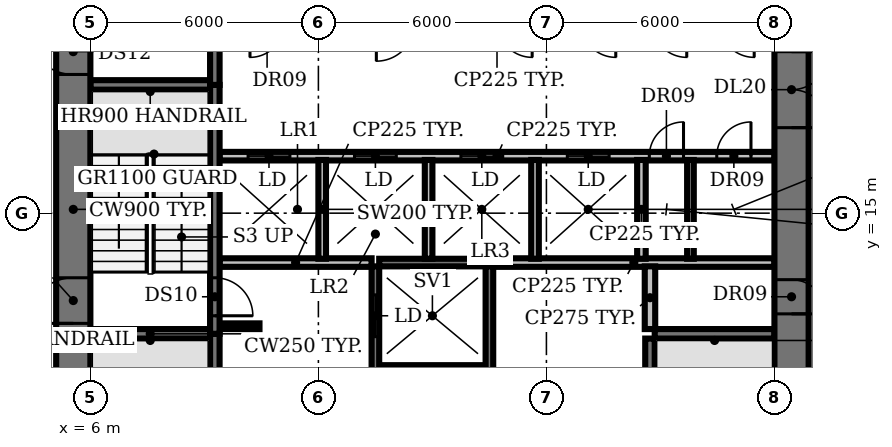
"""IFC4 building model, lengths in metres.
Left out: names, types, materials, properties, quantities, classifications, styles, units other than length and angle.
Written with IfcOpenShell. Run it as: python <this file> out.ifc"""

import sys

from ifc_helpers import new_model, si_unit, direction, frame, frame_2d, origin, place, context, subcontext, project, spatial, rectangle, extrude, element, fill, save


model = new_model("IFC4")
c1 = context("Model", 3, precision=1e-05, world=origin(), true_north=direction((0.0, 1.0)))
c2 = subcontext(c1, "Body", "Model", "MODEL_VIEW")
j1 = project(units=[si_unit("LENGTHUNIT", "METRE"), si_unit("PLANEANGLEUNIT", "RADIAN")], contexts=[c1])
p1 = place(None, origin())
s1 = spatial("IfcSite", under=j1, at=p1, CompositionType="ELEMENT")
p2 = place(p1, origin())
s2 = spatial("IfcBuilding", under=s1, at=p2, CompositionType="ELEMENT")
p3 = place(p2, frame((0.0, 0.0, 29.0)))
s3 = spatial("IfcBuildingStorey", under=s2, at=p3, CompositionType="ELEMENT", Elevation=29.0)
p4 = place(p3, frame((13.6, 10.9, 0.0), z_axis=(0.0, 0.0, 1.0), x_axis=(1.0, 0.0, 0.0)))
e1 = element("IfcWall", 1, at=p4, inside=s3, PredefinedType="SHEAR", context=c2, shape_type="SweptSolid", body=[
    extrude(rectangle(XDim=2.8, YDim=0.2, at=frame_2d((1.4, 0.0))), origin(), (0.0, 0.0, 1.0), 3.85),
])
for number, where, z_axis, x_axis in (
    (2, (6.0, 11.825, 0.0), (0.0, 0.0, 1.0), (1.0, 0.0, 0.0)),
    (3, (20.85, 11.825, 0.0), (0.0, 0.0, 1.0), (1.0, 0.0, 0.0)),
):
    element("IfcWall", number, at=place(p3, frame(where, z_axis=z_axis, x_axis=x_axis)), inside=s3, PredefinedType="SHEAR", context=c2, shape_type="SweptSolid", body=[
        extrude(rectangle(XDim=3.15, YDim=0.25, at=frame_2d((1.575, 0.0))), origin(), (0.0, 0.0, 1.0), 3.85),
    ])
p5 = place(p3, frame((9.4, 12.025, 0.0), z_axis=(0.0, 0.0, 1.0), x_axis=(1.0, 0.0, 0.0)))
e4 = element("IfcWall", 4, at=p5, inside=s3, PredefinedType="SHEAR", context=c2, shape_type="SweptSolid", body=[
    extrude(rectangle(XDim=1.05, YDim=0.15, at=frame_2d((0.525, 0.0))), origin(), (0.0, 0.0, 1.0), 3.85),
])
p6 = place(p3, frame((9.4, 13.7, 0.0), z_axis=(0.0, 0.0, 1.0), x_axis=(1.0, 0.0, 0.0)))
e5 = element("IfcWall", 5, at=p6, inside=s3, PredefinedType="PARTITIONING", context=c2, shape_type="SweptSolid", body=[
    extrude(rectangle(XDim=4.0, YDim=0.225, at=frame_2d((2.0, 0.0))), origin(), (0.0, 0.0, 1.0), 3.85),
])
p7 = place(p3, frame((13.6, 13.7, 0.0), z_axis=(0.0, 0.0, 1.0), x_axis=(1.0, 0.0, 0.0)))
e6 = element("IfcWall", 6, at=p7, inside=s3, PredefinedType="SHEAR", context=c2, shape_type="SweptSolid", body=[
    extrude(rectangle(XDim=2.8, YDim=0.2, at=frame_2d((1.4, 0.0))), origin(), (0.0, 0.0, 1.0), 3.85),
])
p8 = place(p3, frame((16.6, 13.7, 0.0), z_axis=(0.0, 0.0, 1.0), x_axis=(1.0, 0.0, 0.0)))
e7 = element("IfcWall", 7, at=p8, inside=s3, PredefinedType="PARTITIONING", context=c2, shape_type="SweptSolid", body=[
    extrude(rectangle(XDim=7.4, YDim=0.225, at=frame_2d((3.7, 0.0))), origin(), (0.0, 0.0, 1.0), 3.85),
])
p9 = place(p3, frame((9.4, 16.5, 0.0), z_axis=(0.0, 0.0, 1.0), x_axis=(1.0, 0.0, 0.0)))
e8 = element("IfcWall", 8, at=p9, inside=s3, PredefinedType="PARTITIONING", context=c2, shape_type="SweptSolid", body=[
    extrude(rectangle(XDim=14.6, YDim=0.225, at=frame_2d((7.3, 0.0))), origin(), (0.0, 0.0, 1.0), 3.85),
])
p10 = place(p9, frame((0.75, 0.0, 0.0)))
e9 = element("IfcOpeningElement", 9, at=p10, cuts=e8, PredefinedType="OPENING", context=c2, shape_type="SweptSolid", body=[
    extrude(rectangle(XDim=1.1, YDim=2.1, at=frame_2d((0.55, 1.05))), frame((0.0, 0.123, 0.0), z_axis=(0.0, -1.0, 0.0), x_axis=(1.0, 0.0, 0.0)), (0.0, 0.0, 1.0), 0.245),
])
p11 = place(p9, frame((3.55, 0.0, 0.0)))
e10 = element("IfcOpeningElement", 10, at=p11, cuts=e8, PredefinedType="OPENING", context=c2, shape_type="SweptSolid", body=[
    extrude(rectangle(XDim=1.1, YDim=2.1, at=frame_2d((0.55, 1.05))), frame((0.0, 0.123, 0.0), z_axis=(0.0, -1.0, 0.0), x_axis=(1.0, 0.0, 0.0)), (0.0, 0.0, 1.0), 0.245),
])
p12 = place(p9, frame((6.35, 0.0, 0.0)))
e11 = element("IfcOpeningElement", 11, at=p12, cuts=e8, PredefinedType="OPENING", context=c2, shape_type="SweptSolid", body=[
    extrude(rectangle(XDim=1.1, YDim=2.1, at=frame_2d((0.55, 1.05))), frame((0.0, 0.123, 0.0), z_axis=(0.0, -1.0, 0.0), x_axis=(1.0, 0.0, 0.0)), (0.0, 0.0, 1.0), 0.245),
])
p13 = place(p9, frame((9.15, 0.0, 0.0)))
e12 = element("IfcOpeningElement", 12, at=p13, cuts=e8, PredefinedType="OPENING", context=c2, shape_type="SweptSolid", body=[
    extrude(rectangle(XDim=1.1, YDim=2.1, at=frame_2d((0.55, 1.05))), frame((0.0, 0.123, 0.0), z_axis=(0.0, -1.0, 0.0), x_axis=(1.0, 0.0, 0.0)), (0.0, 0.0, 1.0), 0.245),
])
p14 = place(p9, frame((11.308, 0.0, 0.0)))
e13 = element("IfcOpeningElement", 13, at=p14, cuts=e8, PredefinedType="OPENING", context=c2, shape_type="SweptSolid", body=[
    extrude(rectangle(XDim=0.9, YDim=2.1, at=frame_2d((0.45, 1.05))), frame((0.0, 0.123, 0.0), z_axis=(0.0, -1.0, 0.0), x_axis=(1.0, 0.0, 0.0)), (0.0, 0.0, 1.0), 0.245),
])
p15 = place(p9, frame((13.083, 0.0, 0.0)))
e14 = element("IfcOpeningElement", 14, at=p15, cuts=e8, PredefinedType="OPENING", context=c2, shape_type="SweptSolid", body=[
    extrude(rectangle(XDim=0.9, YDim=2.1, at=frame_2d((0.45, 1.05))), frame((0.0, 0.123, 0.0), z_axis=(0.0, -1.0, 0.0), x_axis=(1.0, 0.0, 0.0)), (0.0, 0.0, 1.0), 0.245),
])
p16 = place(p3, frame((6.0, 18.375, 0.0), z_axis=(0.0, 0.0, 1.0), x_axis=(1.0, 0.0, 0.0)))
e15 = element("IfcWall", 15, at=p16, inside=s3, PredefinedType="SHEAR", context=c2, shape_type="SweptSolid", body=[
    extrude(rectangle(XDim=3.15, YDim=0.25, at=frame_2d((1.575, 0.0))), origin(), (0.0, 0.0, 1.0), 3.85),
])
p17 = place(p3, frame((9.275, 11.825, 0.0), z_axis=(0.0, 0.0, 1.0), x_axis=(0.0, -1.0, 0.0)))
e16 = element("IfcWall", 16, at=p17, inside=s3, PredefinedType="SHEAR", context=c2, shape_type="SweptSolid", body=[
    extrude(rectangle(XDim=6.425, YDim=0.25, at=frame_2d((3.212, 0.0))), origin(), (0.0, 0.0, 1.0), 3.85),
])
p18 = place(p17, frame((5.075, 0.0, 0.0)))
e17 = element("IfcOpeningElement", 17, at=p18, cuts=e16, PredefinedType="OPENING", context=c2, shape_type="SweptSolid", body=[
    extrude(rectangle(XDim=1.0, YDim=2.1, at=frame_2d((0.5, 1.05))), frame((0.0, 0.135, 0.0), z_axis=(0.0, -1.0, 0.0), x_axis=(1.0, 0.0, 0.0)), (0.0, 0.0, 1.0), 0.27),
])
p19 = place(p3, frame((9.275, 18.375, 0.0), z_axis=(0.0, 0.0, 1.0), x_axis=(0.0, -1.0, 0.0)))
e18 = element("IfcWall", 18, at=p19, inside=s3, PredefinedType="SHEAR", context=c2, shape_type="SweptSolid", body=[
    extrude(rectangle(XDim=6.55, YDim=0.25, at=frame_2d((3.275, 0.0))), origin(), (0.0, 0.0, 1.0), 3.85),
])
p20 = place(p19, frame((5.075, 0.0, 0.0)))
e19 = element("IfcOpeningElement", 19, at=p20, cuts=e18, PredefinedType="OPENING", context=c2, shape_type="SweptSolid", body=[
    extrude(rectangle(XDim=1.0, YDim=2.1, at=frame_2d((0.5, 1.05))), frame((0.0, 0.135, 0.0), z_axis=(0.0, -1.0, 0.0), x_axis=(1.0, 0.0, 0.0)), (0.0, 0.0, 1.0), 0.27),
])
p21 = place(p3, frame((9.275, 18.375, 0.0), z_axis=(0.0, 0.0, 1.0), x_axis=(0.0, 1.0, 0.0)))
e20 = element("IfcWall", 20, at=p21, inside=s3, PredefinedType="SHEAR", context=c2, shape_type="SweptSolid", body=[
    extrude(rectangle(XDim=6.425, YDim=0.25, at=frame_2d((3.212, 0.0))), origin(), (0.0, 0.0, 1.0), 3.85),
])
p22 = place(p3, frame((12.1, 13.8, 0.0), z_axis=(0.0, 0.0, 1.0), x_axis=(0.0, 1.0, 0.0)))
e21 = element("IfcWall", 21, at=p22, inside=s3, PredefinedType="SOLIDWALL", context=c2, shape_type="SweptSolid", body=[
    extrude(rectangle(XDim=2.6, YDim=0.2, at=frame_2d((1.3, 0.0))), origin(), (0.0, 0.0, 1.0), 3.85),
])
p23 = place(p3, frame((13.5, 5.4, 0.0), z_axis=(0.0, 0.0, 1.0), x_axis=(0.0, 1.0, 0.0)))
e22 = element("IfcWall", 22, at=p23, inside=s3, PredefinedType="SHEAR", context=c2, shape_type="SweptSolid", body=[
    extrude(rectangle(XDim=8.2, YDim=0.2, at=frame_2d((4.1, 0.0))), origin(), (0.0, 0.0, 1.0), 3.85),
])
p24 = place(p23, frame((0.75, 0.0, 0.0)))
e23 = element("IfcOpeningElement", 23, at=p24, cuts=e22, PredefinedType="OPENING", context=c2, shape_type="SweptSolid", body=[
    extrude(rectangle(XDim=1.1, YDim=2.1, at=frame_2d((0.55, 1.05))), frame((0.0, 0.11, 0.0), z_axis=(0.0, -1.0, 0.0), x_axis=(1.0, 0.0, 0.0)), (0.0, 0.0, 1.0), 0.22),
])
p25 = place(p23, frame((3.55, 0.0, 0.0)))
e24 = element("IfcOpeningElement", 24, at=p25, cuts=e22, PredefinedType="OPENING", context=c2, shape_type="SweptSolid", body=[
    extrude(rectangle(XDim=1.1, YDim=2.1, at=frame_2d((0.55, 1.05))), frame((0.0, 0.11, 0.0), z_axis=(0.0, -1.0, 0.0), x_axis=(1.0, 0.0, 0.0)), (0.0, 0.0, 1.0), 0.22),
])
p26 = place(p23, frame((6.35, 0.0, 0.0)))
e25 = element("IfcOpeningElement", 25, at=p26, cuts=e22, PredefinedType="OPENING", context=c2, shape_type="SweptSolid", body=[
    extrude(rectangle(XDim=1.1, YDim=2.1, at=frame_2d((0.55, 1.05))), frame((0.0, 0.11, 0.0), z_axis=(0.0, -1.0, 0.0), x_axis=(1.0, 0.0, 0.0)), (0.0, 0.0, 1.0), 0.22),
])
p27 = place(p3, frame((14.9, 13.8, 0.0), z_axis=(0.0, 0.0, 1.0), x_axis=(0.0, 1.0, 0.0)))
e26 = element("IfcWall", 26, at=p27, inside=s3, PredefinedType="SOLIDWALL", context=c2, shape_type="SweptSolid", body=[
    extrude(rectangle(XDim=2.6, YDim=0.2, at=frame_2d((1.3, 0.0))), origin(), (0.0, 0.0, 1.0), 3.85),
])
p28 = place(p3, frame((16.5, 5.4, 0.0), z_axis=(0.0, 0.0, 1.0), x_axis=(0.0, 1.0, 0.0)))
e27 = element("IfcWall", 27, at=p28, inside=s3, PredefinedType="SHEAR", context=c2, shape_type="SweptSolid", body=[
    extrude(rectangle(XDim=8.2, YDim=0.2, at=frame_2d((4.1, 0.0))), origin(), (0.0, 0.0, 1.0), 3.85),
])
p29 = place(p3, frame((17.7, 13.8, 0.0), z_axis=(0.0, 0.0, 1.0), x_axis=(0.0, 1.0, 0.0)))
e28 = element("IfcWall", 28, at=p29, inside=s3, PredefinedType="SOLIDWALL", context=c2, shape_type="SweptSolid", body=[
    extrude(rectangle(XDim=2.6, YDim=0.2, at=frame_2d((1.3, 0.0))), origin(), (0.0, 0.0, 1.0), 3.85),
])
p30 = place(p3, frame((20.5, 13.8, 0.0), z_axis=(0.0, 0.0, 1.0), x_axis=(0.0, 1.0, 0.0)))
e29 = element("IfcWall", 29, at=p30, inside=s3, PredefinedType="PARTITIONING", context=c2, shape_type="SweptSolid", body=[
    extrude(rectangle(XDim=2.6, YDim=0.225, at=frame_2d((1.3, 0.0))), origin(), (0.0, 0.0, 1.0), 3.85),
])
p31 = place(p3, frame((20.725, 5.4, 0.0), z_axis=(0.0, 0.0, 1.0), x_axis=(0.0, 1.0, 0.0)))
e30 = element("IfcWall", 30, at=p31, inside=s3, PredefinedType="SHEAR", context=c2, shape_type="SweptSolid", body=[
    extrude(rectangle(XDim=6.3, YDim=0.25, at=frame_2d((3.15, 0.0))), origin(), (0.0, 0.0, 1.0), 3.85),
])
p32 = place(p3, frame((20.725, 11.95, 0.0), z_axis=(0.0, 0.0, 1.0), x_axis=(0.0, 1.0, 0.0)))
e31 = element("IfcWall", 31, at=p32, inside=s3, PredefinedType="PARTITIONING", context=c2, shape_type="SweptSolid", body=[
    extrude(rectangle(XDim=1.65, YDim=0.275, at=frame_2d((0.825, 0.0))), origin(), (0.0, 0.0, 1.0), 3.85),
])
p33 = place(p3, frame((21.79, 13.8, 0.0), z_axis=(0.0, 0.0, 1.0), x_axis=(0.0, 1.0, 0.0)))
e32 = element("IfcWall", 32, at=p33, inside=s3, PredefinedType="PARTITIONING", context=c2, shape_type="SweptSolid", body=[
    extrude(rectangle(XDim=2.6, YDim=0.175, at=frame_2d((1.3, 0.0))), origin(), (0.0, 0.0, 1.0), 3.85),
])
p34 = place(p3, frame((5.55, 4.5, 0.0), z_axis=(0.0, 0.0, 1.0), x_axis=(0.0, 1.0, 0.0)))
e33 = element("IfcWall", 33, at=p34, inside=s3, PredefinedType="SHEAR", context=c2, shape_type="SweptSolid", body=[
    extrude(rectangle(XDim=21.2, YDim=0.9, at=frame_2d((10.6, 0.0))), origin(), (0.0, 0.0, 1.0), 3.85),
])
p35 = place(p34, frame((1.15, 0.0, 0.0)))
e34 = element("IfcOpeningElement", 34, at=p35, cuts=e33, PredefinedType="OPENING", context=c2, shape_type="SweptSolid", body=[
    extrude(rectangle(XDim=1.5, YDim=2.1, at=frame_2d((0.75, 1.05))), frame((0.0, 0.46, 0.0), z_axis=(0.0, -1.0, 0.0), x_axis=(1.0, 0.0, 0.0)), (0.0, 0.0, 1.0), 0.92),
])
p36 = place(p34, frame((7.6, 0.0, 0.0)))
e35 = element("IfcOpeningElement", 35, at=p36, cuts=e33, PredefinedType="OPENING", context=c2, shape_type="SweptSolid", body=[
    extrude(rectangle(XDim=1.2, YDim=2.1, at=frame_2d((0.6, 1.05))), frame((0.0, 0.46, 0.0), z_axis=(0.0, -1.0, 0.0), x_axis=(1.0, 0.0, 0.0)), (0.0, 0.0, 1.0), 0.92),
])
p37 = place(p34, frame((14.15, 0.0, 0.0)))
e36 = element("IfcOpeningElement", 36, at=p37, cuts=e33, PredefinedType="OPENING", context=c2, shape_type="SweptSolid", body=[
    extrude(rectangle(XDim=1.2, YDim=2.1, at=frame_2d((0.6, 1.05))), frame((0.0, 0.46, 0.0), z_axis=(0.0, -1.0, 0.0), x_axis=(1.0, 0.0, 0.0)), (0.0, 0.0, 1.0), 0.92),
])
p38 = place(p3, frame((24.45, 25.7, 0.0), z_axis=(0.0, 0.0, 1.0), x_axis=(0.0, -1.0, 0.0)))
e37 = element("IfcWall", 37, at=p38, inside=s3, PredefinedType="SHEAR", context=c2, shape_type="SweptSolid", body=[
    extrude(rectangle(XDim=21.2, YDim=0.9, at=frame_2d((10.6, 0.0))), origin(), (0.0, 0.0, 1.0), 3.85),
])
p39 = place(p38, frame((18.55, 0.0, 0.0)))
e38 = element("IfcOpeningElement", 38, at=p39, cuts=e37, PredefinedType="OPENING", context=c2, shape_type="SweptSolid", body=[
    extrude(rectangle(XDim=1.5, YDim=2.1, at=frame_2d((0.75, 1.05))), frame((0.0, 0.46, 0.0), z_axis=(0.0, -1.0, 0.0), x_axis=(1.0, 0.0, 0.0)), (0.0, 0.0, 1.0), 0.92),
])
p40 = place(p38, frame((12.45, 0.0, 0.0)))
e39 = element("IfcOpeningElement", 39, at=p40, cuts=e37, PredefinedType="OPENING", context=c2, shape_type="SweptSolid", body=[
    extrude(rectangle(XDim=0.9, YDim=2.1, at=frame_2d((0.45, 1.05))), frame((0.0, 0.46, 0.0), z_axis=(0.0, -1.0, 0.0), x_axis=(1.0, 0.0, 0.0)), (0.0, 0.0, 1.0), 0.92),
])
p41 = place(p38, frame((6.45, 0.0, 0.0)))
e40 = element("IfcOpeningElement", 40, at=p41, cuts=e37, PredefinedType="OPENING", context=c2, shape_type="SweptSolid", body=[
    extrude(rectangle(XDim=2.0, YDim=2.1, at=frame_2d((1.0, 1.05))), frame((0.0, 0.46, 0.0), z_axis=(0.0, -1.0, 0.0), x_axis=(1.0, 0.0, 0.0)), (0.0, 0.0, 1.0), 0.92),
])
p42 = place(p10, origin())
e41 = element("IfcDoor", 41, at=p42, inside=s3, OperationType="DOUBLE_DOOR_SLIDING", PredefinedType="DOOR", context=c2, shape_type="SweptSolid", body=[
    extrude(rectangle(XDim=1.1, YDim=2.1, at=frame_2d((0.55, 1.05))), frame((0.0, 0.025, 0.0), z_axis=(0.0, -1.0, 0.0), x_axis=(1.0, 0.0, 0.0)), (0.0, 0.0, 1.0), 0.05),
])
fill(e9, e41)
p43 = place(p11, origin())
e42 = element("IfcDoor", 42, at=p43, inside=s3, OperationType="DOUBLE_DOOR_SLIDING", PredefinedType="DOOR", context=c2, shape_type="SweptSolid", body=[
    extrude(rectangle(XDim=1.1, YDim=2.1, at=frame_2d((0.55, 1.05))), frame((0.0, 0.025, 0.0), z_axis=(0.0, -1.0, 0.0), x_axis=(1.0, 0.0, 0.0)), (0.0, 0.0, 1.0), 0.05),
])
fill(e10, e42)
p44 = place(p12, origin())
e43 = element("IfcDoor", 43, at=p44, inside=s3, OperationType="DOUBLE_DOOR_SLIDING", PredefinedType="DOOR", context=c2, shape_type="SweptSolid", body=[
    extrude(rectangle(XDim=1.1, YDim=2.1, at=frame_2d((0.55, 1.05))), frame((0.0, 0.025, 0.0), z_axis=(0.0, -1.0, 0.0), x_axis=(1.0, 0.0, 0.0)), (0.0, 0.0, 1.0), 0.05),
])
fill(e11, e43)
p45 = place(p13, origin())
e44 = element("IfcDoor", 44, at=p45, inside=s3, OperationType="DOUBLE_DOOR_SLIDING", PredefinedType="DOOR", context=c2, shape_type="SweptSolid", body=[
    extrude(rectangle(XDim=1.1, YDim=2.1, at=frame_2d((0.55, 1.05))), frame((0.0, 0.025, 0.0), z_axis=(0.0, -1.0, 0.0), x_axis=(1.0, 0.0, 0.0)), (0.0, 0.0, 1.0), 0.05),
])
fill(e12, e44)
p46 = place(p14, origin())
e45 = element("IfcDoor", 45, at=p46, inside=s3, OperationType="SINGLE_SWING_RIGHT", PredefinedType="DOOR", context=c2, shape_type="SweptSolid", body=[
    extrude(rectangle(XDim=0.9, YDim=2.1, at=frame_2d((0.45, 1.05))), frame((0.0, 0.025, 0.0), z_axis=(0.0, -1.0, 0.0), x_axis=(1.0, 0.0, 0.0)), (0.0, 0.0, 1.0), 0.05),
])
fill(e13, e45)
p47 = place(p15, origin())
e46 = element("IfcDoor", 46, at=p47, inside=s3, OperationType="SINGLE_SWING_RIGHT", PredefinedType="DOOR", context=c2, shape_type="SweptSolid", body=[
    extrude(rectangle(XDim=0.9, YDim=2.1, at=frame_2d((0.45, 1.05))), frame((0.0, 0.025, 0.0), z_axis=(0.0, -1.0, 0.0), x_axis=(1.0, 0.0, 0.0)), (0.0, 0.0, 1.0), 0.05),
])
fill(e14, e46)
p48 = place(p20, origin())
e47 = element("IfcDoor", 47, at=p48, inside=s3, OperationType="SINGLE_SWING_RIGHT", PredefinedType="DOOR", context=c2, shape_type="SweptSolid", body=[
    extrude(rectangle(XDim=1.0, YDim=2.1, at=frame_2d((0.5, 1.05))), frame((0.0, 0.025, 0.0), z_axis=(0.0, -1.0, 0.0), x_axis=(1.0, 0.0, 0.0)), (0.0, 0.0, 1.0), 0.05),
])
fill(e19, e47)
p49 = place(p26, origin())
e48 = element("IfcDoor", 48, at=p49, inside=s3, OperationType="DOUBLE_DOOR_SLIDING", PredefinedType="DOOR", context=c2, shape_type="SweptSolid", body=[
    extrude(rectangle(XDim=1.1, YDim=2.1, at=frame_2d((0.55, 1.05))), frame((0.0, 0.025, 0.0), z_axis=(0.0, -1.0, 0.0), x_axis=(1.0, 0.0, 0.0)), (0.0, 0.0, 1.0), 0.05),
])
fill(e25, e48)
p50 = place(p36, origin())
e49 = element("IfcDoor", 49, at=p50, inside=s3, OperationType="SINGLE_SWING_LEFT", PredefinedType="DOOR", context=c2, shape_type="SweptSolid", body=[
    extrude(rectangle(XDim=1.2, YDim=2.1, at=frame_2d((0.6, 1.05))), frame((0.0, 0.025, 0.0), z_axis=(0.0, -1.0, 0.0), x_axis=(1.0, 0.0, 0.0)), (0.0, 0.0, 1.0), 0.05),
])
fill(e35, e49)
p51 = place(p37, origin())
e50 = element("IfcDoor", 50, at=p51, inside=s3, OperationType="SINGLE_SWING_RIGHT", PredefinedType="DOOR", context=c2, shape_type="SweptSolid", body=[
    extrude(rectangle(XDim=1.2, YDim=2.1, at=frame_2d((0.6, 1.05))), frame((0.0, 0.025, 0.0), z_axis=(0.0, -1.0, 0.0), x_axis=(1.0, 0.0, 0.0)), (0.0, 0.0, 1.0), 0.05),
])
fill(e36, e50)
p52 = place(p40, origin())
e51 = element("IfcDoor", 51, at=p52, inside=s3, OperationType="SINGLE_SWING_RIGHT", PredefinedType="DOOR", context=c2, shape_type="SweptSolid", body=[
    extrude(rectangle(XDim=0.9, YDim=2.1, at=frame_2d((0.45, 1.05))), frame((0.0, -0.39, 0.0), z_axis=(0.0, -1.0, 0.0), x_axis=(1.0, 0.0, 0.0)), (0.0, 0.0, 1.0), 0.05),
])
fill(e39, e51)
p53 = place(p41, origin())
e52 = element("IfcDoor", 52, at=p53, inside=s3, OperationType="DOUBLE_DOOR_SINGLE_SWING", PredefinedType="DOOR", context=c2, shape_type="SweptSolid", body=[
    extrude(rectangle(XDim=2.0, YDim=2.1, at=frame_2d((1.0, 1.05))), frame((0.0, 0.025, 0.0), z_axis=(0.0, -1.0, 0.0), x_axis=(1.0, 0.0, 0.0)), (0.0, 0.0, 1.0), 0.05),
])
fill(e40, e52)
save(model, sys.argv[1])
